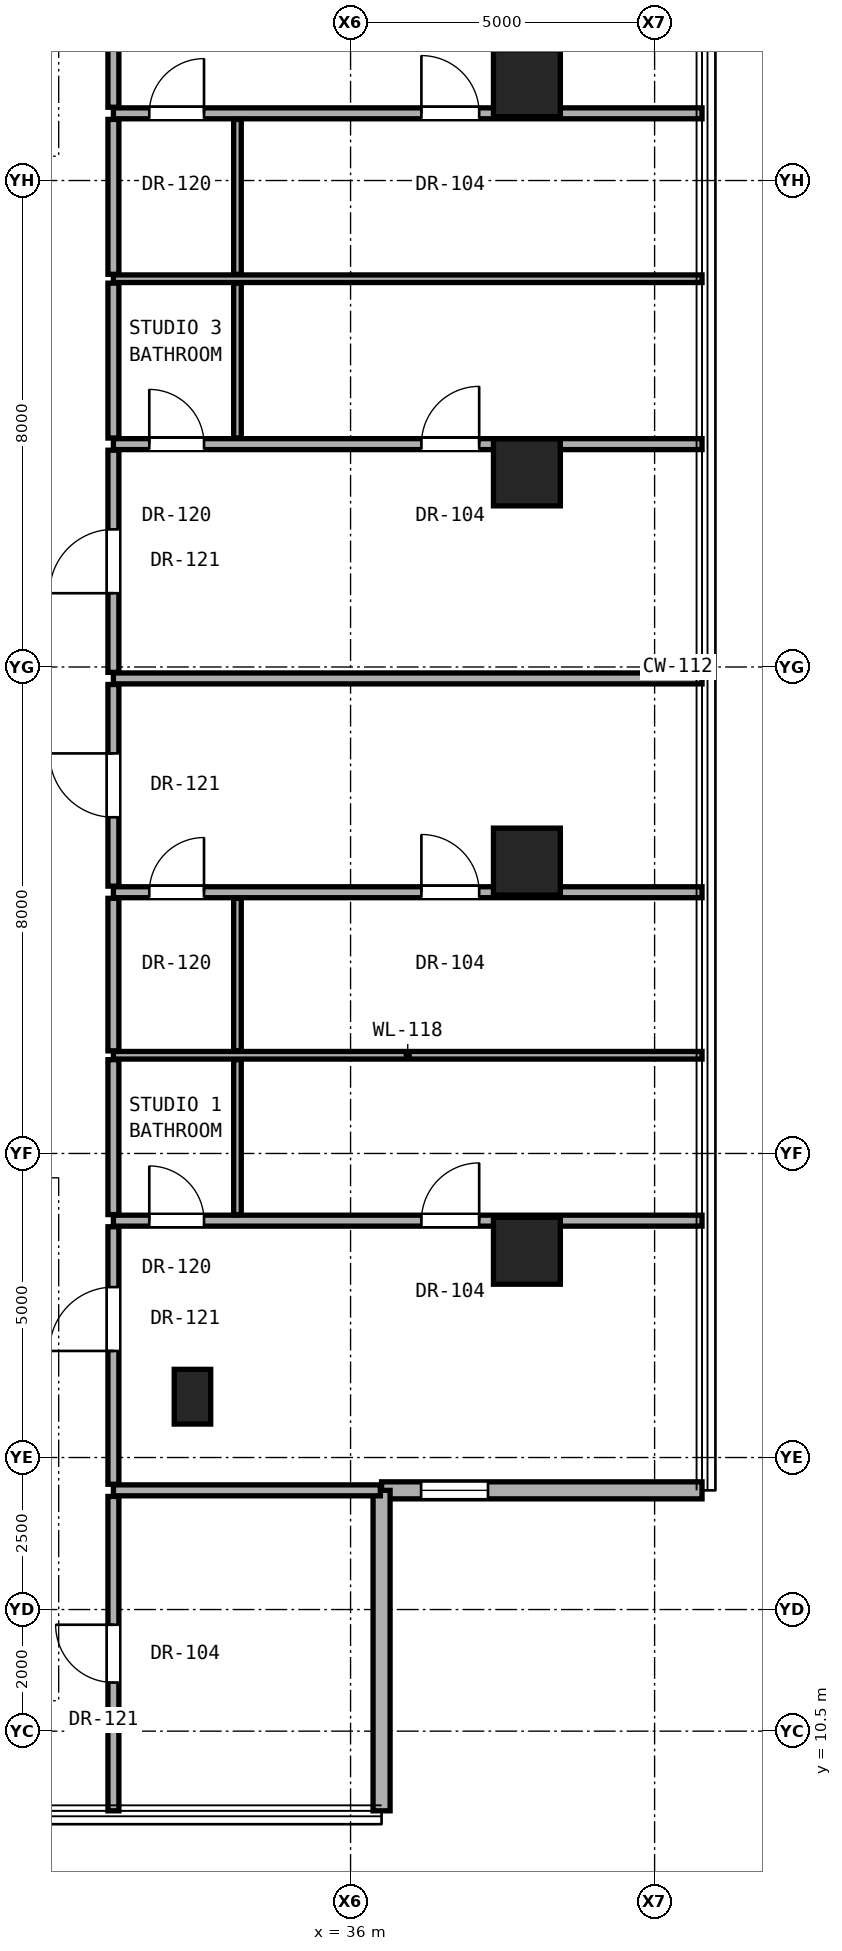
"""IFC4 building model, lengths in metres.
Left out: names, types, materials, properties, quantities, classifications, styles, units other than length and angle.
Written with IfcOpenShell. Run it as: python <this file> out.ifc"""

import sys

from ifc_helpers import new_model, si_unit, direction, frame, frame_2d, origin, origin_2d, place, context, subcontext, project, spatial, rectangle, hollow_rectangle, extrude, element, fill, save


model = new_model("IFC4")
c1 = context("Model", 3, precision=1e-05, world=origin(), true_north=direction((0.0, 1.0)))
c2 = subcontext(c1, "Body", "Model", "MODEL_VIEW")
j1 = project(units=[si_unit("LENGTHUNIT", "METRE"), si_unit("PLANEANGLEUNIT", "RADIAN")], contexts=[c1])
p1 = place(None, origin())
s1 = spatial("IfcSite", under=j1, at=p1, CompositionType="ELEMENT")
p2 = place(p1, origin())
s2 = spatial("IfcBuilding", under=s1, at=p2, CompositionType="ELEMENT")
p3 = place(p2, frame((0.0, 0.0, 134.6)))
s3 = spatial("IfcBuildingStorey", under=s2, at=p3, CompositionType="ELEMENT", Elevation=134.6)
for number, where, z_axis, x_axis in (
    (1, (38.9, 18.4, 0.0), (0.0, 0.0, 1.0), (1.0, 0.0, 0.0)),
    (2, (38.9, 24.8, 0.0), (0.0, 0.0, 1.0), (1.0, 0.0, 0.0)),
    (3, (38.9, 31.2, 0.0), (0.0, 0.0, 1.0), (1.0, 0.0, 0.0)),
    (4, (38.9, 37.6, 0.0), (0.0, 0.0, 1.0), (1.0, 0.0, 0.0)),
):
    element("IfcColumn", number, at=place(p3, frame(where, z_axis=z_axis, x_axis=x_axis)), inside=s3, PredefinedType="COLUMN", context=c2, shape_type="SweptSolid", body=[
        extrude(hollow_rectangle(XDim=1.1, YDim=1.1, WallThickness=0.06, at=origin_2d()), origin(), (0.0, 0.0, 1.0), 3.3),
    ])
p4 = place(p3, frame((33.4, 16.0, 0.0), z_axis=(0.0, 0.0, 1.0), x_axis=(1.0, 0.0, 0.0)))
e5 = element("IfcColumn", 5, at=p4, inside=s3, PredefinedType="PILASTER", context=c2, shape_type="SweptSolid", body=[
    extrude(rectangle(XDim=0.6, YDim=0.9, at=origin_2d()), origin(), (0.0, 0.0, 1.0), 3.3),
])
p5 = place(p3, frame((36.51, 14.46, 0.0), z_axis=(0.0, 0.0, 1.0), x_axis=(1.0, 0.0, 0.0)))
e6 = element("IfcWall", 6, at=p5, inside=s3, PredefinedType="SOLIDWALL", context=c2, shape_type="SweptSolid", body=[
    extrude(rectangle(XDim=5.27, YDim=0.28, at=frame_2d((2.635, 0.0))), origin(), (0.0, 0.0, 1.0), 3.06),
])
p6 = place(p5, frame((0.65, 0.0, 0.85)))
e7 = element("IfcOpeningElement", 7, at=p6, cuts=e6, PredefinedType="OPENING", context=c2, shape_type="SweptSolid", body=[
    extrude(rectangle(XDim=1.1, YDim=2.0, at=frame_2d((0.55, 1.0))), frame((0.0, 0.15, 0.0), z_axis=(0.0, -1.0, 0.0), x_axis=(1.0, 0.0, 0.0)), (0.0, 0.0, 1.0), 0.3),
])
p7 = place(p3, frame((36.51, 9.19, 0.0), z_axis=(0.0, 0.0, 1.0), x_axis=(0.0, 1.0, 0.0)))
e8 = element("IfcWall", 8, at=p7, inside=s3, PredefinedType="SOLIDWALL", context=c2, shape_type="SweptSolid", body=[
    extrude(rectangle(XDim=5.27, YDim=0.28, at=frame_2d((2.635, 0.0))), origin(), (0.0, 0.0, 1.0), 3.06),
])
p8 = place(p3, frame((32.1, 14.46, 0.0), z_axis=(0.0, 0.0, 1.0), x_axis=(1.0, 0.0, 0.0)))
e9 = element("IfcWall", 9, at=p8, inside=s3, PredefinedType="PARTITIONING", context=c2, shape_type="SweptSolid", body=[
    extrude(rectangle(XDim=4.39, YDim=0.18, at=frame_2d((2.195, 0.0))), origin(), (0.0, 0.0, 1.0), 3.08),
])
p9 = place(p3, frame((32.1, 18.895, 0.0), z_axis=(0.0, 0.0, 1.0), x_axis=(1.0, 0.0, 0.0)))
e10 = element("IfcWall", 10, at=p9, inside=s3, PredefinedType="PARTITIONING", context=c2, shape_type="SweptSolid", body=[
    extrude(rectangle(XDim=9.68, YDim=0.18, at=frame_2d((4.84, 0.0))), origin(), (0.0, 0.0, 1.0), 2.299),
])
p10 = place(p9, frame((5.065, 0.0, 0.0)))
e11 = element("IfcOpeningElement", 11, at=p10, cuts=e10, PredefinedType="OPENING", context=c2, shape_type="SweptSolid", body=[
    extrude(rectangle(XDim=0.95, YDim=2.15, at=frame_2d((0.475, 1.075))), frame((0.0, 0.1, 0.0), z_axis=(0.0, -1.0, 0.0), x_axis=(1.0, 0.0, 0.0)), (0.0, 0.0, 1.0), 0.2),
])
p11 = place(p9, frame((0.59, 0.0, 0.0)))
e12 = element("IfcOpeningElement", 12, at=p11, cuts=e10, PredefinedType="OPENING", context=c2, shape_type="SweptSolid", body=[
    extrude(rectangle(XDim=0.9, YDim=2.1, at=frame_2d((0.45, 1.05))), frame((0.0, 0.1, 0.0), z_axis=(0.0, -1.0, 0.0), x_axis=(1.0, 0.0, 0.0)), (0.0, 0.0, 1.0), 0.2),
])
p12 = place(p3, frame((32.1, 21.615, 0.0), z_axis=(0.0, 0.0, 1.0), x_axis=(1.0, 0.0, 0.0)))
e13 = element("IfcWall", 13, at=p12, inside=s3, PredefinedType="PARTITIONING", context=c2, shape_type="SweptSolid", body=[
    extrude(rectangle(XDim=9.68, YDim=0.125, at=frame_2d((4.84, 0.0))), origin(), (0.0, 0.0, 1.0), 2.299),
])
p13 = place(p3, frame((32.1, 24.296, 0.0), z_axis=(0.0, 0.0, 1.0), x_axis=(1.0, 0.0, 0.0)))
e14 = element("IfcWall", 14, at=p13, inside=s3, PredefinedType="PARTITIONING", context=c2, shape_type="SweptSolid", body=[
    extrude(rectangle(XDim=9.68, YDim=0.18, at=frame_2d((4.84, 0.0))), origin(), (0.0, 0.0, 1.0), 2.299),
])
p14 = place(p13, frame((5.065, 0.0, 0.0)))
e15 = element("IfcOpeningElement", 15, at=p14, cuts=e14, PredefinedType="OPENING", context=c2, shape_type="SweptSolid", body=[
    extrude(rectangle(XDim=0.95, YDim=2.15, at=frame_2d((0.475, 1.075))), frame((0.0, 0.1, 0.0), z_axis=(0.0, -1.0, 0.0), x_axis=(1.0, 0.0, 0.0)), (0.0, 0.0, 1.0), 0.2),
])
p15 = place(p13, frame((0.59, 0.0, 0.0)))
e16 = element("IfcOpeningElement", 16, at=p15, cuts=e14, PredefinedType="OPENING", context=c2, shape_type="SweptSolid", body=[
    extrude(rectangle(XDim=0.9, YDim=2.1, at=frame_2d((0.45, 1.05))), frame((0.0, 0.1, 0.0), z_axis=(0.0, -1.0, 0.0), x_axis=(1.0, 0.0, 0.0)), (0.0, 0.0, 1.0), 0.2),
])
p16 = place(p3, frame((32.1, 27.812, 0.0), z_axis=(0.0, 0.0, 1.0), x_axis=(1.0, 0.0, 0.0)))
e17 = element("IfcWall", 17, at=p16, inside=s3, PredefinedType="PARTITIONING", context=c2, shape_type="SweptSolid", body=[
    extrude(rectangle(XDim=9.68, YDim=0.18, at=frame_2d((4.84, 0.0))), origin(), (0.0, 0.0, 1.0), 2.299),
])
p17 = place(p3, frame((32.1, 31.665, 0.0), z_axis=(0.0, 0.0, 1.0), x_axis=(1.0, 0.0, 0.0)))
e18 = element("IfcWall", 18, at=p17, inside=s3, PredefinedType="PARTITIONING", context=c2, shape_type="SweptSolid", body=[
    extrude(rectangle(XDim=9.68, YDim=0.18, at=frame_2d((4.84, 0.0))), origin(), (0.0, 0.0, 1.0), 2.299),
])
p18 = place(p17, frame((5.065, 0.0, 0.0)))
e19 = element("IfcOpeningElement", 19, at=p18, cuts=e18, PredefinedType="OPENING", context=c2, shape_type="SweptSolid", body=[
    extrude(rectangle(XDim=0.95, YDim=2.15, at=frame_2d((0.475, 1.075))), frame((0.0, 0.1, 0.0), z_axis=(0.0, -1.0, 0.0), x_axis=(1.0, 0.0, 0.0)), (0.0, 0.0, 1.0), 0.2),
])
p19 = place(p17, frame((0.59, 0.0, 0.0)))
e20 = element("IfcOpeningElement", 20, at=p19, cuts=e18, PredefinedType="OPENING", context=c2, shape_type="SweptSolid", body=[
    extrude(rectangle(XDim=0.9, YDim=2.1, at=frame_2d((0.45, 1.05))), frame((0.0, 0.1, 0.0), z_axis=(0.0, -1.0, 0.0), x_axis=(1.0, 0.0, 0.0)), (0.0, 0.0, 1.0), 0.2),
])
p20 = place(p3, frame((32.1, 34.385, 0.0), z_axis=(0.0, 0.0, 1.0), x_axis=(1.0, 0.0, 0.0)))
e21 = element("IfcWall", 21, at=p20, inside=s3, PredefinedType="PARTITIONING", context=c2, shape_type="SweptSolid", body=[
    extrude(rectangle(XDim=9.68, YDim=0.125, at=frame_2d((4.84, 0.0))), origin(), (0.0, 0.0, 1.0), 2.299),
])
p21 = place(p3, frame((32.1, 37.105, 0.0), z_axis=(0.0, 0.0, 1.0), x_axis=(1.0, 0.0, 0.0)))
e22 = element("IfcWall", 22, at=p21, inside=s3, PredefinedType="PARTITIONING", context=c2, shape_type="SweptSolid", body=[
    extrude(rectangle(XDim=9.68, YDim=0.18, at=frame_2d((4.84, 0.0))), origin(), (0.0, 0.0, 1.0), 2.299),
])
p22 = place(p21, frame((5.065, 0.0, 0.0)))
e23 = element("IfcOpeningElement", 23, at=p22, cuts=e22, PredefinedType="OPENING", context=c2, shape_type="SweptSolid", body=[
    extrude(rectangle(XDim=0.95, YDim=2.15, at=frame_2d((0.475, 1.075))), frame((0.0, 0.1, 0.0), z_axis=(0.0, -1.0, 0.0), x_axis=(1.0, 0.0, 0.0)), (0.0, 0.0, 1.0), 0.2),
])
p23 = place(p21, frame((0.59, 0.0, 0.0)))
e24 = element("IfcOpeningElement", 24, at=p23, cuts=e22, PredefinedType="OPENING", context=c2, shape_type="SweptSolid", body=[
    extrude(rectangle(XDim=0.9, YDim=2.1, at=frame_2d((0.45, 1.05))), frame((0.0, 0.1, 0.0), z_axis=(0.0, -1.0, 0.0), x_axis=(1.0, 0.0, 0.0)), (0.0, 0.0, 1.0), 0.2),
])
p24 = place(p3, frame((32.1, 9.19, 0.0), z_axis=(0.0, 0.0, 1.0), x_axis=(0.0, 1.0, 0.0)))
e25 = element("IfcWall", 25, at=p24, inside=s3, PredefinedType="PARTITIONING", context=c2, shape_type="SweptSolid", body=[
    extrude(rectangle(XDim=5.17, YDim=0.18, at=frame_2d((2.585, 0.0))), origin(), (0.0, 0.0, 1.0), 3.08),
])
p25 = place(p24, frame((2.11, 0.0, 0.0)))
e26 = element("IfcOpeningElement", 26, at=p25, cuts=e25, PredefinedType="OPENING", context=c2, shape_type="SweptSolid", body=[
    extrude(rectangle(XDim=0.95, YDim=2.15, at=frame_2d((0.475, 1.075))), frame((0.0, 0.1, 0.0), z_axis=(0.0, -1.0, 0.0), x_axis=(1.0, 0.0, 0.0)), (0.0, 0.0, 1.0), 0.2),
])
p26 = place(p3, frame((32.1, 14.56, 0.0), z_axis=(0.0, 0.0, 1.0), x_axis=(0.0, 1.0, 0.0)))
e27 = element("IfcWall", 27, at=p26, inside=s3, PredefinedType="PARTITIONING", context=c2, shape_type="SweptSolid", body=[
    extrude(rectangle(XDim=4.235, YDim=0.18, at=frame_2d((2.117, 0.0))), origin(), (0.0, 0.0, 1.0), 2.456),
])
p27 = place(p26, frame((2.192, 0.0, 0.0)))
e28 = element("IfcOpeningElement", 28, at=p27, cuts=e27, PredefinedType="OPENING", context=c2, shape_type="SweptSolid", body=[
    extrude(rectangle(XDim=1.05, YDim=2.2, at=frame_2d((0.525, 1.1))), frame((0.0, 0.1, 0.0), z_axis=(0.0, -1.0, 0.0), x_axis=(1.0, 0.0, 0.0)), (0.0, 0.0, 1.0), 0.2),
])
p28 = place(p3, frame((32.1, 18.995, 0.0), z_axis=(0.0, 0.0, 1.0), x_axis=(0.0, 1.0, 0.0)))
e29 = element("IfcWall", 29, at=p28, inside=s3, PredefinedType="PARTITIONING", context=c2, shape_type="SweptSolid", body=[
    extrude(rectangle(XDim=2.547, YDim=0.18, at=frame_2d((1.274, 0.0))), origin(), (0.0, 0.0, 1.0), 3.08),
])
p29 = place(p3, frame((32.1, 21.688, 0.0), z_axis=(0.0, 0.0, 1.0), x_axis=(0.0, 1.0, 0.0)))
e30 = element("IfcWall", 30, at=p29, inside=s3, PredefinedType="PARTITIONING", context=c2, shape_type="SweptSolid", body=[
    extrude(rectangle(XDim=2.509, YDim=0.18, at=frame_2d((1.254, 0.0))), origin(), (0.0, 0.0, 1.0), 3.08),
])
p30 = place(p3, frame((32.1, 24.396, 0.0), z_axis=(0.0, 0.0, 1.0), x_axis=(0.0, 1.0, 0.0)))
e31 = element("IfcWall", 31, at=p30, inside=s3, PredefinedType="PARTITIONING", context=c2, shape_type="SweptSolid", body=[
    extrude(rectangle(XDim=3.316, YDim=0.18, at=frame_2d((1.658, 0.0))), origin(), (0.0, 0.0, 1.0), 2.299),
])
p31 = place(p30, frame((1.133, 0.0, 0.0)))
e32 = element("IfcOpeningElement", 32, at=p31, cuts=e31, PredefinedType="OPENING", context=c2, shape_type="SweptSolid", body=[
    extrude(rectangle(XDim=1.05, YDim=2.2, at=frame_2d((0.525, 1.1))), frame((0.0, 0.1, 0.0), z_axis=(0.0, -1.0, 0.0), x_axis=(1.0, 0.0, 0.0)), (0.0, 0.0, 1.0), 0.2),
])
p32 = place(p3, frame((32.1, 27.912, 0.0), z_axis=(0.0, 0.0, 1.0), x_axis=(0.0, 1.0, 0.0)))
e33 = element("IfcWall", 33, at=p32, inside=s3, PredefinedType="PARTITIONING", context=c2, shape_type="SweptSolid", body=[
    extrude(rectangle(XDim=3.653, YDim=0.18, at=frame_2d((1.826, 0.0))), origin(), (0.0, 0.0, 1.0), 2.299),
])
p33 = place(p32, frame((1.302, 0.0, 0.0)))
e34 = element("IfcOpeningElement", 34, at=p33, cuts=e33, PredefinedType="OPENING", context=c2, shape_type="SweptSolid", body=[
    extrude(rectangle(XDim=1.05, YDim=2.2, at=frame_2d((0.525, 1.1))), frame((0.0, 0.1, 0.0), z_axis=(0.0, -1.0, 0.0), x_axis=(1.0, 0.0, 0.0)), (0.0, 0.0, 1.0), 0.2),
])
p34 = place(p3, frame((32.1, 31.765, 0.0), z_axis=(0.0, 0.0, 1.0), x_axis=(0.0, 1.0, 0.0)))
e35 = element("IfcWall", 35, at=p34, inside=s3, PredefinedType="PARTITIONING", context=c2, shape_type="SweptSolid", body=[
    extrude(rectangle(XDim=2.548, YDim=0.18, at=frame_2d((1.274, 0.0))), origin(), (0.0, 0.0, 1.0), 3.08),
])
p35 = place(p3, frame((32.1, 34.458, 0.0), z_axis=(0.0, 0.0, 1.0), x_axis=(0.0, 1.0, 0.0)))
e36 = element("IfcWall", 36, at=p35, inside=s3, PredefinedType="PARTITIONING", context=c2, shape_type="SweptSolid", body=[
    extrude(rectangle(XDim=2.547, YDim=0.18, at=frame_2d((1.274, 0.0))), origin(), (0.0, 0.0, 1.0), 3.08),
])
p36 = place(p3, frame((32.1, 37.205, 0.0), z_axis=(0.0, 0.0, 1.0), x_axis=(0.0, 1.0, 0.0)))
e37 = element("IfcWall", 37, at=p36, inside=s3, PredefinedType="PARTITIONING", context=c2, shape_type="SweptSolid", body=[
    extrude(rectangle(XDim=4.235, YDim=0.18, at=frame_2d((2.117, 0.0))), origin(), (0.0, 0.0, 1.0), 2.456),
])
p37 = place(p36, frame((0.992, 0.0, 0.0)))
e38 = element("IfcOpeningElement", 38, at=p37, cuts=e37, PredefinedType="OPENING", context=c2, shape_type="SweptSolid", body=[
    extrude(rectangle(XDim=1.05, YDim=2.2, at=frame_2d((0.525, 1.1))), frame((0.0, 0.1, 0.0), z_axis=(0.0, -1.0, 0.0), x_axis=(1.0, 0.0, 0.0)), (0.0, 0.0, 1.0), 0.2),
])
p38 = place(p3, frame((34.14, 18.995, 0.0), z_axis=(0.0, 0.0, 1.0), x_axis=(0.0, 1.0, 0.0)))
e39 = element("IfcWall", 39, at=p38, inside=s3, PredefinedType="PARTITIONING", context=c2, shape_type="SweptSolid", body=[
    extrude(rectangle(XDim=2.547, YDim=0.125, at=frame_2d((1.274, 0.0))), origin(), (0.0, 0.0, 1.0), 3.08),
])
p39 = place(p3, frame((34.14, 21.688, 0.0), z_axis=(0.0, 0.0, 1.0), x_axis=(0.0, 1.0, 0.0)))
e40 = element("IfcWall", 40, at=p39, inside=s3, PredefinedType="PARTITIONING", context=c2, shape_type="SweptSolid", body=[
    extrude(rectangle(XDim=2.509, YDim=0.125, at=frame_2d((1.254, 0.0))), origin(), (0.0, 0.0, 1.0), 3.08),
])
p40 = place(p3, frame((34.14, 31.765, 0.0), z_axis=(0.0, 0.0, 1.0), x_axis=(0.0, 1.0, 0.0)))
e41 = element("IfcWall", 41, at=p40, inside=s3, PredefinedType="PARTITIONING", context=c2, shape_type="SweptSolid", body=[
    extrude(rectangle(XDim=2.548, YDim=0.125, at=frame_2d((1.274, 0.0))), origin(), (0.0, 0.0, 1.0), 3.08),
])
p41 = place(p3, frame((34.14, 34.458, 0.0), z_axis=(0.0, 0.0, 1.0), x_axis=(0.0, 1.0, 0.0)))
e42 = element("IfcWall", 42, at=p41, inside=s3, PredefinedType="PARTITIONING", context=c2, shape_type="SweptSolid", body=[
    extrude(rectangle(XDim=2.547, YDim=0.125, at=frame_2d((1.274, 0.0))), origin(), (0.0, 0.0, 1.0), 3.08),
])
p42 = place(p6, origin())
e43 = element("IfcWindow", 43, at=p42, inside=s3, PartitioningType="SINGLE_PANEL", PredefinedType="WINDOW", context=c2, shape_type="SweptSolid", body=[
    extrude(rectangle(XDim=1.1, YDim=2.0, at=frame_2d((0.55, 1.0))), frame((0.0, 0.03, 0.0), z_axis=(0.0, -1.0, 0.0), x_axis=(1.0, 0.0, 0.0)), (0.0, 0.0, 1.0), 0.06),
])
fill(e7, e43)
p43 = place(p27, origin())
e44 = element("IfcDoor", 44, at=p43, inside=s3, OperationType="SINGLE_SWING_LEFT", PredefinedType="DOOR", context=c2, shape_type="SweptSolid", body=[
    extrude(rectangle(XDim=1.05, YDim=2.2, at=frame_2d((0.525, 1.1))), frame((0.0, 0.025, 0.0), z_axis=(0.0, -1.0, 0.0), x_axis=(1.0, 0.0, 0.0)), (0.0, 0.0, 1.0), 0.05),
])
fill(e28, e44)
p44 = place(p10, origin())
e45 = element("IfcDoor", 45, at=p44, inside=s3, OperationType="SINGLE_SWING_RIGHT", PredefinedType="DOOR", context=c2, shape_type="SweptSolid", body=[
    extrude(rectangle(XDim=0.95, YDim=2.15, at=frame_2d((0.475, 1.075))), frame((0.0, 0.025, 0.0), z_axis=(0.0, -1.0, 0.0), x_axis=(1.0, 0.0, 0.0)), (0.0, 0.0, 1.0), 0.05),
])
fill(e11, e45)
p45 = place(p11, origin())
e46 = element("IfcDoor", 46, at=p45, inside=s3, OperationType="SINGLE_SWING_LEFT", PredefinedType="DOOR", context=c2, shape_type="SweptSolid", body=[
    extrude(rectangle(XDim=0.9, YDim=2.1, at=frame_2d((0.45, 1.05))), frame((0.0, 0.025, 0.0), z_axis=(0.0, -1.0, 0.0), x_axis=(1.0, 0.0, 0.0)), (0.0, 0.0, 1.0), 0.05),
])
fill(e12, e46)
p46 = place(p31, origin())
e47 = element("IfcDoor", 47, at=p46, inside=s3, OperationType="SINGLE_SWING_RIGHT", PredefinedType="DOOR", context=c2, shape_type="SweptSolid", body=[
    extrude(rectangle(XDim=1.05, YDim=2.2, at=frame_2d((0.525, 1.1))), frame((0.0, 0.025, 0.0), z_axis=(0.0, -1.0, 0.0), x_axis=(1.0, 0.0, 0.0)), (0.0, 0.0, 1.0), 0.05),
])
fill(e32, e47)
p47 = place(p14, origin())
e48 = element("IfcDoor", 48, at=p47, inside=s3, OperationType="SINGLE_SWING_LEFT", PredefinedType="DOOR", context=c2, shape_type="SweptSolid", body=[
    extrude(rectangle(XDim=0.95, YDim=2.15, at=frame_2d((0.475, 1.075))), frame((0.0, 0.025, 0.0), z_axis=(0.0, -1.0, 0.0), x_axis=(1.0, 0.0, 0.0)), (0.0, 0.0, 1.0), 0.05),
])
fill(e15, e48)
p48 = place(p15, origin())
e49 = element("IfcDoor", 49, at=p48, inside=s3, OperationType="SINGLE_SWING_RIGHT", PredefinedType="DOOR", context=c2, shape_type="SweptSolid", body=[
    extrude(rectangle(XDim=0.9, YDim=2.1, at=frame_2d((0.45, 1.05))), frame((0.0, 0.025, 0.0), z_axis=(0.0, -1.0, 0.0), x_axis=(1.0, 0.0, 0.0)), (0.0, 0.0, 1.0), 0.05),
])
fill(e16, e49)
p49 = place(p33, origin())
e50 = element("IfcDoor", 50, at=p49, inside=s3, OperationType="SINGLE_SWING_LEFT", PredefinedType="DOOR", context=c2, shape_type="SweptSolid", body=[
    extrude(rectangle(XDim=1.05, YDim=2.2, at=frame_2d((0.525, 1.1))), frame((0.0, 0.025, 0.0), z_axis=(0.0, -1.0, 0.0), x_axis=(1.0, 0.0, 0.0)), (0.0, 0.0, 1.0), 0.05),
])
fill(e34, e50)
p50 = place(p18, origin())
e51 = element("IfcDoor", 51, at=p50, inside=s3, OperationType="SINGLE_SWING_RIGHT", PredefinedType="DOOR", context=c2, shape_type="SweptSolid", body=[
    extrude(rectangle(XDim=0.95, YDim=2.15, at=frame_2d((0.475, 1.075))), frame((0.0, 0.025, 0.0), z_axis=(0.0, -1.0, 0.0), x_axis=(1.0, 0.0, 0.0)), (0.0, 0.0, 1.0), 0.05),
])
fill(e19, e51)
p51 = place(p19, origin())
e52 = element("IfcDoor", 52, at=p51, inside=s3, OperationType="SINGLE_SWING_LEFT", PredefinedType="DOOR", context=c2, shape_type="SweptSolid", body=[
    extrude(rectangle(XDim=0.9, YDim=2.1, at=frame_2d((0.45, 1.05))), frame((0.0, 0.025, 0.0), z_axis=(0.0, -1.0, 0.0), x_axis=(1.0, 0.0, 0.0)), (0.0, 0.0, 1.0), 0.05),
])
fill(e20, e52)
p52 = place(p22, origin())
e53 = element("IfcDoor", 53, at=p52, inside=s3, OperationType="SINGLE_SWING_LEFT", PredefinedType="DOOR", context=c2, shape_type="SweptSolid", body=[
    extrude(rectangle(XDim=0.95, YDim=2.15, at=frame_2d((0.475, 1.075))), frame((0.0, 0.025, 0.0), z_axis=(0.0, -1.0, 0.0), x_axis=(1.0, 0.0, 0.0)), (0.0, 0.0, 1.0), 0.05),
])
fill(e23, e53)
p53 = place(p23, origin())
e54 = element("IfcDoor", 54, at=p53, inside=s3, OperationType="SINGLE_SWING_RIGHT", PredefinedType="DOOR", context=c2, shape_type="SweptSolid", body=[
    extrude(rectangle(XDim=0.9, YDim=2.1, at=frame_2d((0.45, 1.05))), frame((0.0, 0.025, 0.0), z_axis=(0.0, -1.0, 0.0), x_axis=(1.0, 0.0, 0.0)), (0.0, 0.0, 1.0), 0.05),
])
fill(e24, e54)
p54 = place(p25, origin())
e55 = element("IfcDoor", 55, at=p54, inside=s3, OperationType="SINGLE_SWING_RIGHT", PredefinedType="DOOR", context=c2, shape_type="SweptSolid", body=[
    extrude(rectangle(XDim=0.95, YDim=2.15, at=frame_2d((0.475, 1.075))), frame((0.0, 0.025, 0.0), z_axis=(0.0, -1.0, 0.0), x_axis=(1.0, 0.0, 0.0)), (0.0, 0.0, 1.0), 0.05),
])
fill(e26, e55)
save(model, sys.argv[1])
